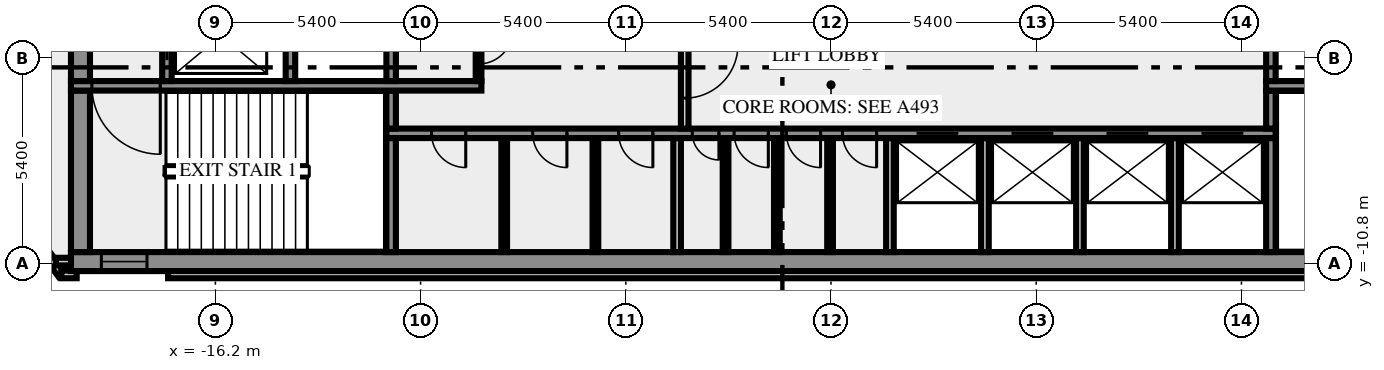
"""IFC4 building model, lengths in metres.
Left out: names, types, materials, properties, quantities, classifications, styles, units other than length and angle.
Written with IfcOpenShell. Run it as: python <this file> out.ifc"""

import sys

from ifc_helpers import new_model, si_unit, direction, frame, frame_2d, origin, place, context, subcontext, project, spatial, rectangle, extrude, element, fill, save


model = new_model("IFC4")
c1 = context("Model", 3, precision=1e-05, world=origin(), true_north=direction((0.0, 1.0)))
c2 = subcontext(c1, "Body", "Model", "MODEL_VIEW")
j1 = project(units=[si_unit("LENGTHUNIT", "METRE"), si_unit("PLANEANGLEUNIT", "RADIAN")], contexts=[c1])
p1 = place(None, origin())
s1 = spatial("IfcSite", under=j1, at=p1, CompositionType="ELEMENT")
p2 = place(p1, origin())
s2 = spatial("IfcBuilding", under=s1, at=p2, CompositionType="ELEMENT")
p3 = place(p2, frame((0.0, 0.0, 206.0)))
s3 = spatial("IfcBuildingStorey", under=s2, at=p3, CompositionType="ELEMENT", Elevation=206.0)
p4 = place(p3, frame((-21.833, -8.909, 0.0), z_axis=(0.0, 0.0, 1.0), x_axis=(0.587766567315, -0.809030569476, 0.0)))
e1 = element("IfcWall", 1, at=p4, inside=s3, PredefinedType="SOLIDWALL", context=c2, shape_type="SweptSolid", body=[
    extrude(rectangle(XDim=2.688, YDim=0.2, at=frame_2d((1.344, 0.0))), origin(), (0.0, 0.0, 1.0), 3.65),
])
p5 = place(p3, frame((-20.256, -11.088, 0.0), z_axis=(0.0, 0.0, 1.0), x_axis=(1.0, 0.0, 0.0)))
e2 = element("IfcWall", 2, at=p5, inside=s3, PredefinedType="SOLIDWALL", context=c2, shape_type="SweptSolid", body=[
    extrude(rectangle(XDim=0.406, YDim=0.2, at=frame_2d((0.203, 0.0))), origin(), (0.0, 0.0, 1.0), 3.65),
])
p6 = place(p3, frame((-17.444, -11.088, 0.0), z_axis=(0.0, 0.0, 1.0), x_axis=(1.0, 0.0, 0.0)))
e3 = element("IfcWall", 3, at=p6, inside=s3, PredefinedType="SOLIDWALL", context=c2, shape_type="SweptSolid", body=[
    extrude(rectangle(XDim=34.888, YDim=0.2, at=frame_2d((17.444, 0.0))), origin(), (0.0, 0.0, 1.0), 3.65),
])
p7 = place(p3, frame((-19.98, -10.75, 0.0), z_axis=(0.0, 0.0, 1.0), x_axis=(-1.0, 0.0, 0.0)))
e4 = element("IfcWall", 4, at=p7, inside=s3, PredefinedType="SOLIDWALL", context=c2, shape_type="SweptSolid", body=[
    extrude(rectangle(XDim=0.417, YDim=0.2, at=frame_2d((0.208, 0.0))), origin(), (0.0, 0.0, 1.0), 3.65),
])
p8 = place(p3, frame((-20.0, -10.75, 0.0), z_axis=(0.0, 0.0, 1.0), x_axis=(1.0, 0.0, 0.0)))
e5 = element("IfcWall", 5, at=p8, inside=s3, PredefinedType="SHEAR", context=c2, shape_type="SweptSolid", body=[
    extrude(rectangle(XDim=40.0, YDim=0.5, at=frame_2d((20.0, 0.0))), origin(), (0.0, 0.0, 1.0), 3.65),
])
p9 = place(p8, frame((0.8, 0.0, 1.0)))
e6 = element("IfcOpeningElement", 6, at=p9, cuts=e5, PredefinedType="OPENING", context=c2, shape_type="SweptSolid", body=[
    extrude(rectangle(XDim=1.2, YDim=1.2, at=frame_2d((0.6, 0.6))), frame((0.0, 0.26, 0.0), z_axis=(0.0, -1.0, 0.0), x_axis=(1.0, 0.0, 0.0)), (0.0, 0.0, 1.0), 0.52),
])
p10 = place(p8, frame((38.0, 0.0, 1.0)))
e7 = element("IfcOpeningElement", 7, at=p10, cuts=e5, PredefinedType="OPENING", context=c2, shape_type="SweptSolid", body=[
    extrude(rectangle(XDim=1.2, YDim=1.2, at=frame_2d((0.6, 0.6))), frame((0.0, 0.26, 0.0), z_axis=(0.0, -1.0, 0.0), x_axis=(1.0, 0.0, 0.0)), (0.0, 0.0, 1.0), 0.52),
])
p11 = place(p3, frame((-19.75, -10.5, 0.0), z_axis=(0.0, 0.0, 1.0), x_axis=(0.0, 1.0, 0.0)))
e8 = element("IfcWall", 8, at=p11, inside=s3, PredefinedType="SHEAR", context=c2, shape_type="SweptSolid", body=[
    extrude(rectangle(XDim=4.25, YDim=0.5, at=frame_2d((2.125, 0.0))), origin(), (0.0, 0.0, 1.0), 3.65),
])
p12 = place(p3, frame((-11.575, -10.5, 0.0), z_axis=(0.0, 0.0, 1.0), x_axis=(0.0, 1.0, 0.0)))
e9 = element("IfcWall", 9, at=p12, inside=s3, PredefinedType="SHEAR", context=c2, shape_type="SweptSolid", body=[
    extrude(rectangle(XDim=3.0, YDim=0.25, at=frame_2d((1.5, 0.0))), origin(), (0.0, 0.0, 1.0), 3.65),
])
for number, where, z_axis, x_axis in (
    (10, (-8.6, -10.5, 0.0), (0.0, 0.0, 1.0), (0.0, 1.0, 0.0)),
    (11, (-6.2, -10.5, 0.0), (0.0, 0.0, 1.0), (0.0, 1.0, 0.0)),
):
    element("IfcWall", number, at=place(p3, frame(where, z_axis=z_axis, x_axis=x_axis)), inside=s3, PredefinedType="PARTITIONING", context=c2, shape_type="SweptSolid", body=[
        extrude(rectangle(XDim=3.0, YDim=0.15, at=frame_2d((1.5, 0.0))), origin(), (0.0, 0.0, 1.0), 3.65),
    ])
p13 = place(p3, frame((-4.05, -10.5, 0.0), z_axis=(0.0, 0.0, 1.0), x_axis=(0.0, 1.0, 0.0)))
e12 = element("IfcWall", 12, at=p13, inside=s3, PredefinedType="SOLIDWALL", context=c2, shape_type="SweptSolid", body=[
    extrude(rectangle(XDim=3.0, YDim=0.2, at=frame_2d((1.5, 0.0))), origin(), (0.0, 0.0, 1.0), 3.65),
])
for number, where, z_axis, x_axis in (
    (13, (-2.775, -10.5, 0.0), (0.0, 0.0, 1.0), (0.0, 1.0, 0.0)),
    (14, (-1.425, -10.5, 0.0), (0.0, 0.0, 1.0), (0.0, 1.0, 0.0)),
    (15, (-0.025, -10.5, 0.0), (0.0, 0.0, 1.0), (0.0, 1.0, 0.0)),
):
    element("IfcWall", number, at=place(p3, frame(where, z_axis=z_axis, x_axis=x_axis)), inside=s3, PredefinedType="PARTITIONING", context=c2, shape_type="SweptSolid", body=[
        extrude(rectangle(XDim=3.0, YDim=0.15, at=frame_2d((1.5, 0.0))), origin(), (0.0, 0.0, 1.0), 3.65),
    ])
for number, where, z_axis, x_axis in (
    (16, (1.55, -10.5, 0.0), (0.0, 0.0, 1.0), (0.0, 1.0, 0.0)),
    (17, (4.05, -10.5, 0.0), (0.0, 0.0, 1.0), (0.0, 1.0, 0.0)),
    (18, (6.55, -10.5, 0.0), (0.0, 0.0, 1.0), (0.0, 1.0, 0.0)),
    (19, (9.05, -10.5, 0.0), (0.0, 0.0, 1.0), (0.0, 1.0, 0.0)),
):
    element("IfcWall", number, at=place(p3, frame(where, z_axis=z_axis, x_axis=x_axis)), inside=s3, PredefinedType="SOLIDWALL", context=c2, shape_type="SweptSolid", body=[
        extrude(rectangle(XDim=3.0, YDim=0.2, at=frame_2d((1.5, 0.0))), origin(), (0.0, 0.0, 1.0), 3.65),
    ])
p14 = place(p3, frame((11.575, -10.5, 0.0), z_axis=(0.0, 0.0, 1.0), x_axis=(0.0, 1.0, 0.0)))
e20 = element("IfcWall", 20, at=p14, inside=s3, PredefinedType="SHEAR", context=c2, shape_type="SweptSolid", body=[
    extrude(rectangle(XDim=3.0, YDim=0.25, at=frame_2d((1.5, 0.0))), origin(), (0.0, 0.0, 1.0), 3.65),
])
p15 = place(p3, frame((11.7, -7.375, 0.0), z_axis=(0.0, 0.0, 1.0), x_axis=(-1.0, 0.0, 0.0)))
e21 = element("IfcWall", 21, at=p15, inside=s3, PredefinedType="SHEAR", context=c2, shape_type="SweptSolid", body=[
    extrude(rectangle(XDim=23.4, YDim=0.25, at=frame_2d((11.7, 0.0))), origin(), (0.0, 0.0, 1.0), 3.65),
])
p16 = place(p15, frame((21.312, 0.0, 0.0)))
e22 = element("IfcOpeningElement", 22, at=p16, cuts=e21, PredefinedType="OPENING", context=c2, shape_type="SweptSolid", body=[
    extrude(rectangle(XDim=0.9, YDim=2.1, at=frame_2d((0.45, 1.05))), frame((0.0, 0.135, 0.0), z_axis=(0.0, -1.0, 0.0), x_axis=(1.0, 0.0, 0.0)), (0.0, 0.0, 1.0), 0.27),
])
p17 = place(p15, frame((18.65, 0.0, 0.0)))
e23 = element("IfcOpeningElement", 23, at=p17, cuts=e21, PredefinedType="OPENING", context=c2, shape_type="SweptSolid", body=[
    extrude(rectangle(XDim=0.9, YDim=2.1, at=frame_2d((0.45, 1.05))), frame((0.0, 0.135, 0.0), z_axis=(0.0, -1.0, 0.0), x_axis=(1.0, 0.0, 0.0)), (0.0, 0.0, 1.0), 0.27),
])
p18 = place(p15, frame((16.388, 0.0, 0.0)))
e24 = element("IfcOpeningElement", 24, at=p18, cuts=e21, PredefinedType="OPENING", context=c2, shape_type="SweptSolid", body=[
    extrude(rectangle(XDim=0.9, YDim=2.1, at=frame_2d((0.45, 1.05))), frame((0.0, 0.135, 0.0), z_axis=(0.0, -1.0, 0.0), x_axis=(1.0, 0.0, 0.0)), (0.0, 0.0, 1.0), 0.27),
])
p19 = place(p15, frame((14.65, 0.0, 0.0)))
e25 = element("IfcOpeningElement", 25, at=p19, cuts=e21, PredefinedType="OPENING", context=c2, shape_type="SweptSolid", body=[
    extrude(rectangle(XDim=0.7, YDim=2.1, at=frame_2d((0.35, 1.05))), frame((0.0, 0.135, 0.0), z_axis=(0.0, -1.0, 0.0), x_axis=(1.0, 0.0, 0.0)), (0.0, 0.0, 1.0), 0.27),
])
p20 = place(p15, frame((13.35, 0.0, 0.0)))
e26 = element("IfcOpeningElement", 26, at=p20, cuts=e21, PredefinedType="OPENING", context=c2, shape_type="SweptSolid", body=[
    extrude(rectangle(XDim=0.9, YDim=2.1, at=frame_2d((0.45, 1.05))), frame((0.0, 0.135, 0.0), z_axis=(0.0, -1.0, 0.0), x_axis=(1.0, 0.0, 0.0)), (0.0, 0.0, 1.0), 0.27),
])
p21 = place(p15, frame((11.975, 0.0, 0.0)))
e27 = element("IfcOpeningElement", 27, at=p21, cuts=e21, PredefinedType="OPENING", context=c2, shape_type="SweptSolid", body=[
    extrude(rectangle(XDim=0.9, YDim=2.1, at=frame_2d((0.45, 1.05))), frame((0.0, 0.135, 0.0), z_axis=(0.0, -1.0, 0.0), x_axis=(1.0, 0.0, 0.0)), (0.0, 0.0, 1.0), 0.27),
])
p22 = place(p15, frame((10.5, 0.0, 0.0)))
e28 = element("IfcOpeningElement", 28, at=p22, cuts=e21, PredefinedType="OPENING", context=c2, shape_type="SweptSolid", body=[
    extrude(rectangle(XDim=0.9, YDim=2.1, at=frame_2d((0.45, 1.05))), frame((0.0, 0.135, 0.0), z_axis=(0.0, -1.0, 0.0), x_axis=(1.0, 0.0, 0.0)), (0.0, 0.0, 1.0), 0.27),
])
p23 = place(p15, frame((8.35, 0.0, 0.0)))
e29 = element("IfcOpeningElement", 29, at=p23, cuts=e21, PredefinedType="OPENING", context=c2, shape_type="SweptSolid", body=[
    extrude(rectangle(XDim=1.1, YDim=2.1, at=frame_2d((0.55, 1.05))), frame((0.0, 0.135, 0.0), z_axis=(0.0, -1.0, 0.0), x_axis=(1.0, 0.0, 0.0)), (0.0, 0.0, 1.0), 0.27),
])
p24 = place(p15, frame((5.85, 0.0, 0.0)))
e30 = element("IfcOpeningElement", 30, at=p24, cuts=e21, PredefinedType="OPENING", context=c2, shape_type="SweptSolid", body=[
    extrude(rectangle(XDim=1.1, YDim=2.1, at=frame_2d((0.55, 1.05))), frame((0.0, 0.135, 0.0), z_axis=(0.0, -1.0, 0.0), x_axis=(1.0, 0.0, 0.0)), (0.0, 0.0, 1.0), 0.27),
])
p25 = place(p15, frame((3.35, 0.0, 0.0)))
e31 = element("IfcOpeningElement", 31, at=p25, cuts=e21, PredefinedType="OPENING", context=c2, shape_type="SweptSolid", body=[
    extrude(rectangle(XDim=1.1, YDim=2.1, at=frame_2d((0.55, 1.05))), frame((0.0, 0.135, 0.0), z_axis=(0.0, -1.0, 0.0), x_axis=(1.0, 0.0, 0.0)), (0.0, 0.0, 1.0), 0.27),
])
p26 = place(p15, frame((0.85, 0.0, 0.0)))
e32 = element("IfcOpeningElement", 32, at=p26, cuts=e21, PredefinedType="OPENING", context=c2, shape_type="SweptSolid", body=[
    extrude(rectangle(XDim=1.1, YDim=2.1, at=frame_2d((0.55, 1.05))), frame((0.0, 0.135, 0.0), z_axis=(0.0, -1.0, 0.0), x_axis=(1.0, 0.0, 0.0)), (0.0, 0.0, 1.0), 0.27),
])
p27 = place(p3, frame((-11.575, -7.25, 0.0), z_axis=(0.0, 0.0, 1.0), x_axis=(0.0, 1.0, 0.0)))
e33 = element("IfcWall", 33, at=p27, inside=s3, PredefinedType="SHEAR", context=c2, shape_type="SweptSolid", body=[
    extrude(rectangle(XDim=1.0, YDim=0.25, at=frame_2d((0.5, 0.0))), origin(), (0.0, 0.0, 1.0), 3.65),
])
p28 = place(p3, frame((-3.85, -4.25, 0.0), z_axis=(0.0, 0.0, 1.0), x_axis=(0.0, -1.0, 0.0)))
e34 = element("IfcWall", 34, at=p28, inside=s3, PredefinedType="SOLIDWALL", context=c2, shape_type="SweptSolid", body=[
    extrude(rectangle(XDim=3.0, YDim=0.2, at=frame_2d((1.5, 0.0))), origin(), (0.0, 0.0, 1.0), 3.65),
])
p29 = place(p28, frame((0.8, 0.0, 0.0)))
e35 = element("IfcOpeningElement", 35, at=p29, cuts=e34, PredefinedType="OPENING", context=c2, shape_type="SweptSolid", body=[
    extrude(rectangle(XDim=1.4, YDim=2.1, at=frame_2d((0.7, 1.05))), frame((0.0, 0.11, 0.0), z_axis=(0.0, -1.0, 0.0), x_axis=(1.0, 0.0, 0.0)), (0.0, 0.0, 1.0), 0.22),
])
p30 = place(p3, frame((11.575, -7.25, 0.0), z_axis=(0.0, 0.0, 1.0), x_axis=(0.0, 1.0, 0.0)))
e36 = element("IfcWall", 36, at=p30, inside=s3, PredefinedType="SHEAR", context=c2, shape_type="SweptSolid", body=[
    extrude(rectangle(XDim=1.0, YDim=0.25, at=frame_2d((0.5, 0.0))), origin(), (0.0, 0.0, 1.0), 3.65),
])
p31 = place(p3, frame((-9.2, -6.125, 0.0), z_axis=(0.0, 0.0, 1.0), x_axis=(-1.0, 0.0, 0.0)))
e37 = element("IfcWall", 37, at=p31, inside=s3, PredefinedType="SHEAR", context=c2, shape_type="SweptSolid", body=[
    extrude(rectangle(XDim=10.8, YDim=0.25, at=frame_2d((5.4, 0.0))), origin(), (0.0, 0.0, 1.0), 3.65),
])
p32 = place(p31, frame((8.45, 0.0, 0.0)))
e38 = element("IfcOpeningElement", 38, at=p32, cuts=e37, PredefinedType="OPENING", context=c2, shape_type="SweptSolid", body=[
    extrude(rectangle(XDim=1.8, YDim=2.1, at=frame_2d((0.9, 1.05))), frame((0.0, 0.135, 0.0), z_axis=(0.0, -1.0, 0.0), x_axis=(1.0, 0.0, 0.0)), (0.0, 0.0, 1.0), 0.27),
])
p33 = place(p3, frame((19.5, -6.125, 0.0), z_axis=(0.0, 0.0, 1.0), x_axis=(-1.0, 0.0, 0.0)))
e39 = element("IfcWall", 39, at=p33, inside=s3, PredefinedType="SHEAR", context=c2, shape_type="SweptSolid", body=[
    extrude(rectangle(XDim=8.05, YDim=0.25, at=frame_2d((4.025, 0.0))), origin(), (0.0, 0.0, 1.0), 3.65),
])
p34 = place(p33, frame((0.05, 0.0, 0.0)))
e40 = element("IfcOpeningElement", 40, at=p34, cuts=e39, PredefinedType="OPENING", context=c2, shape_type="SweptSolid", body=[
    extrude(rectangle(XDim=1.8, YDim=2.1, at=frame_2d((0.9, 1.05))), frame((0.0, 0.135, 0.0), z_axis=(0.0, -1.0, 0.0), x_axis=(1.0, 0.0, 0.0)), (0.0, 0.0, 1.0), 0.27),
])
p35 = place(p3, frame((-19.75, -6.0, 0.0), z_axis=(0.0, 0.0, 1.0), x_axis=(0.0, 1.0, 0.0)))
e41 = element("IfcWall", 41, at=p35, inside=s3, PredefinedType="SHEAR", context=c2, shape_type="SweptSolid", body=[
    extrude(rectangle(XDim=4.3, YDim=0.5, at=frame_2d((2.15, 0.0))), origin(), (0.0, 0.0, 1.0), 3.65),
])
p36 = place(p3, frame((-17.475, -6.0, 0.0), z_axis=(0.0, 0.0, 1.0), x_axis=(0.0, 1.0, 0.0)))
e42 = element("IfcWall", 42, at=p36, inside=s3, PredefinedType="SHEAR", context=c2, shape_type="SweptSolid", body=[
    extrude(rectangle(XDim=4.3, YDim=0.25, at=frame_2d((2.15, 0.0))), origin(), (0.0, 0.0, 1.0), 3.65),
])
p37 = place(p36, frame((0.55, 0.0, 0.0)))
e43 = element("IfcOpeningElement", 43, at=p37, cuts=e42, PredefinedType="OPENING", context=c2, shape_type="SweptSolid", body=[
    extrude(rectangle(XDim=1.3, YDim=2.1, at=frame_2d((0.65, 1.05))), frame((0.0, 0.135, 0.0), z_axis=(0.0, -1.0, 0.0), x_axis=(1.0, 0.0, 0.0)), (0.0, 0.0, 1.0), 0.27),
])
p38 = place(p3, frame((-14.225, -6.0, 0.0), z_axis=(0.0, 0.0, 1.0), x_axis=(0.0, 1.0, 0.0)))
e44 = element("IfcWall", 44, at=p38, inside=s3, PredefinedType="SHEAR", context=c2, shape_type="SweptSolid", body=[
    extrude(rectangle(XDim=4.3, YDim=0.25, at=frame_2d((2.15, 0.0))), origin(), (0.0, 0.0, 1.0), 3.65),
])
p39 = place(p3, frame((-11.575, -6.0, 0.0), z_axis=(0.0, 0.0, 1.0), x_axis=(0.0, 1.0, 0.0)))
e45 = element("IfcWall", 45, at=p39, inside=s3, PredefinedType="SHEAR", context=c2, shape_type="SweptSolid", body=[
    extrude(rectangle(XDim=1.75, YDim=0.25, at=frame_2d((0.875, 0.0))), origin(), (0.0, 0.0, 1.0), 3.65),
])
p40 = place(p3, frame((-9.275, -4.25, 0.0), z_axis=(0.0, 0.0, 1.0), x_axis=(0.0, -1.0, 0.0)))
e46 = element("IfcWall", 46, at=p40, inside=s3, PredefinedType="PARTITIONING", context=c2, shape_type="SweptSolid", body=[
    extrude(rectangle(XDim=1.75, YDim=0.15, at=frame_2d((0.875, 0.0))), origin(), (0.0, 0.0, 1.0), 3.65),
])
p41 = place(p40, frame((0.4, 0.0, 0.0)))
e47 = element("IfcOpeningElement", 47, at=p41, cuts=e46, PredefinedType="OPENING", context=c2, shape_type="SweptSolid", body=[
    extrude(rectangle(XDim=0.9, YDim=2.1, at=frame_2d((0.45, 1.05))), frame((0.0, 0.085, 0.0), z_axis=(0.0, -1.0, 0.0), x_axis=(1.0, 0.0, 0.0)), (0.0, 0.0, 1.0), 0.17),
])
p42 = place(p3, frame((11.575, -6.0, 0.0), z_axis=(0.0, 0.0, 1.0), x_axis=(0.0, 1.0, 0.0)))
e48 = element("IfcWall", 48, at=p42, inside=s3, PredefinedType="SHEAR", context=c2, shape_type="SweptSolid", body=[
    extrude(rectangle(XDim=1.75, YDim=0.25, at=frame_2d((0.875, 0.0))), origin(), (0.0, 0.0, 1.0), 3.65),
])
p43 = place(p9, origin())
e49 = element("IfcWindow", 49, at=p43, inside=s3, PartitioningType="SINGLE_PANEL", PredefinedType="WINDOW", context=c2, shape_type="SweptSolid", body=[
    extrude(rectangle(XDim=1.2, YDim=1.2, at=frame_2d((0.6, 0.6))), frame((0.0, 0.03, 0.0), z_axis=(0.0, -1.0, 0.0), x_axis=(1.0, 0.0, 0.0)), (0.0, 0.0, 1.0), 0.06),
])
fill(e6, e49)
p44 = place(p16, origin())
e50 = element("IfcDoor", 50, at=p44, inside=s3, OperationType="SINGLE_SWING_RIGHT", PredefinedType="DOOR", context=c2, shape_type="SweptSolid", body=[
    extrude(rectangle(XDim=0.9, YDim=2.1, at=frame_2d((0.45, 1.05))), frame((0.0, 0.025, 0.0), z_axis=(0.0, -1.0, 0.0), x_axis=(1.0, 0.0, 0.0)), (0.0, 0.0, 1.0), 0.05),
])
fill(e22, e50)
p45 = place(p17, origin())
e51 = element("IfcDoor", 51, at=p45, inside=s3, OperationType="SINGLE_SWING_RIGHT", PredefinedType="DOOR", context=c2, shape_type="SweptSolid", body=[
    extrude(rectangle(XDim=0.9, YDim=2.1, at=frame_2d((0.45, 1.05))), frame((0.0, 0.025, 0.0), z_axis=(0.0, -1.0, 0.0), x_axis=(1.0, 0.0, 0.0)), (0.0, 0.0, 1.0), 0.05),
])
fill(e23, e51)
p46 = place(p18, origin())
e52 = element("IfcDoor", 52, at=p46, inside=s3, OperationType="SINGLE_SWING_RIGHT", PredefinedType="DOOR", context=c2, shape_type="SweptSolid", body=[
    extrude(rectangle(XDim=0.9, YDim=2.1, at=frame_2d((0.45, 1.05))), frame((0.0, 0.025, 0.0), z_axis=(0.0, -1.0, 0.0), x_axis=(1.0, 0.0, 0.0)), (0.0, 0.0, 1.0), 0.05),
])
fill(e24, e52)
p47 = place(p19, origin())
e53 = element("IfcDoor", 53, at=p47, inside=s3, OperationType="SINGLE_SWING_RIGHT", PredefinedType="DOOR", context=c2, shape_type="SweptSolid", body=[
    extrude(rectangle(XDim=0.7, YDim=2.1, at=frame_2d((0.35, 1.05))), frame((0.0, 0.025, 0.0), z_axis=(0.0, -1.0, 0.0), x_axis=(1.0, 0.0, 0.0)), (0.0, 0.0, 1.0), 0.05),
])
fill(e25, e53)
p48 = place(p20, origin())
e54 = element("IfcDoor", 54, at=p48, inside=s3, OperationType="SINGLE_SWING_RIGHT", PredefinedType="DOOR", context=c2, shape_type="SweptSolid", body=[
    extrude(rectangle(XDim=0.9, YDim=2.1, at=frame_2d((0.45, 1.05))), frame((0.0, 0.025, 0.0), z_axis=(0.0, -1.0, 0.0), x_axis=(1.0, 0.0, 0.0)), (0.0, 0.0, 1.0), 0.05),
])
fill(e26, e54)
p49 = place(p21, origin())
e55 = element("IfcDoor", 55, at=p49, inside=s3, OperationType="SINGLE_SWING_RIGHT", PredefinedType="DOOR", context=c2, shape_type="SweptSolid", body=[
    extrude(rectangle(XDim=0.9, YDim=2.1, at=frame_2d((0.45, 1.05))), frame((0.0, 0.025, 0.0), z_axis=(0.0, -1.0, 0.0), x_axis=(1.0, 0.0, 0.0)), (0.0, 0.0, 1.0), 0.05),
])
fill(e27, e55)
p50 = place(p22, origin())
e56 = element("IfcDoor", 56, at=p50, inside=s3, OperationType="SINGLE_SWING_LEFT", PredefinedType="DOOR", context=c2, shape_type="SweptSolid", body=[
    extrude(rectangle(XDim=0.9, YDim=2.1, at=frame_2d((0.45, 1.05))), frame((0.0, 0.025, 0.0), z_axis=(0.0, -1.0, 0.0), x_axis=(1.0, 0.0, 0.0)), (0.0, 0.0, 1.0), 0.05),
])
fill(e28, e56)
p51 = place(p23, origin())
e57 = element("IfcDoor", 57, at=p51, inside=s3, OperationType="DOUBLE_DOOR_SLIDING", PredefinedType="DOOR", context=c2, shape_type="SweptSolid", body=[
    extrude(rectangle(XDim=1.1, YDim=2.1, at=frame_2d((0.55, 1.05))), frame((0.0, 0.025, 0.0), z_axis=(0.0, -1.0, 0.0), x_axis=(1.0, 0.0, 0.0)), (0.0, 0.0, 1.0), 0.05),
])
fill(e29, e57)
p52 = place(p24, origin())
e58 = element("IfcDoor", 58, at=p52, inside=s3, OperationType="DOUBLE_DOOR_SLIDING", PredefinedType="DOOR", context=c2, shape_type="SweptSolid", body=[
    extrude(rectangle(XDim=1.1, YDim=2.1, at=frame_2d((0.55, 1.05))), frame((0.0, 0.025, 0.0), z_axis=(0.0, -1.0, 0.0), x_axis=(1.0, 0.0, 0.0)), (0.0, 0.0, 1.0), 0.05),
])
fill(e30, e58)
p53 = place(p25, origin())
e59 = element("IfcDoor", 59, at=p53, inside=s3, OperationType="DOUBLE_DOOR_SLIDING", PredefinedType="DOOR", context=c2, shape_type="SweptSolid", body=[
    extrude(rectangle(XDim=1.1, YDim=2.1, at=frame_2d((0.55, 1.05))), frame((0.0, 0.025, 0.0), z_axis=(0.0, -1.0, 0.0), x_axis=(1.0, 0.0, 0.0)), (0.0, 0.0, 1.0), 0.05),
])
fill(e31, e59)
p54 = place(p26, origin())
e60 = element("IfcDoor", 60, at=p54, inside=s3, OperationType="DOUBLE_DOOR_SLIDING", PredefinedType="DOOR", context=c2, shape_type="SweptSolid", body=[
    extrude(rectangle(XDim=1.1, YDim=2.1, at=frame_2d((0.55, 1.05))), frame((0.0, 0.025, 0.0), z_axis=(0.0, -1.0, 0.0), x_axis=(1.0, 0.0, 0.0)), (0.0, 0.0, 1.0), 0.05),
])
fill(e32, e60)
p55 = place(p29, origin())
e61 = element("IfcDoor", 61, at=p55, inside=s3, OperationType="DOUBLE_DOOR_SINGLE_SWING", PredefinedType="DOOR", context=c2, shape_type="SweptSolid", body=[
    extrude(rectangle(XDim=1.4, YDim=2.1, at=frame_2d((0.7, 1.05))), frame((0.0, 0.025, 0.0), z_axis=(0.0, -1.0, 0.0), x_axis=(1.0, 0.0, 0.0)), (0.0, 0.0, 1.0), 0.05),
])
fill(e35, e61)
p56 = place(p32, origin())
e62 = element("IfcDoor", 62, at=p56, inside=s3, OperationType="DOUBLE_DOOR_SINGLE_SWING", PredefinedType="DOOR", context=c2, shape_type="SweptSolid", body=[
    extrude(rectangle(XDim=1.8, YDim=2.1, at=frame_2d((0.9, 1.05))), frame((0.0, 0.025, 0.0), z_axis=(0.0, -1.0, 0.0), x_axis=(1.0, 0.0, 0.0)), (0.0, 0.0, 1.0), 0.05),
])
fill(e38, e62)
p57 = place(p37, origin())
e63 = element("IfcDoor", 63, at=p57, inside=s3, OperationType="DOUBLE_DOOR_SLIDING", PredefinedType="DOOR", context=c2, shape_type="SweptSolid", body=[
    extrude(rectangle(XDim=1.3, YDim=2.1, at=frame_2d((0.65, 1.05))), frame((0.0, 0.025, 0.0), z_axis=(0.0, -1.0, 0.0), x_axis=(1.0, 0.0, 0.0)), (0.0, 0.0, 1.0), 0.05),
])
fill(e43, e63)
p58 = place(p41, origin())
e64 = element("IfcDoor", 64, at=p58, inside=s3, OperationType="SINGLE_SWING_LEFT", PredefinedType="DOOR", context=c2, shape_type="SweptSolid", body=[
    extrude(rectangle(XDim=0.9, YDim=2.1, at=frame_2d((0.45, 1.05))), frame((0.0, 0.025, 0.0), z_axis=(0.0, -1.0, 0.0), x_axis=(1.0, 0.0, 0.0)), (0.0, 0.0, 1.0), 0.05),
])
fill(e47, e64)
save(model, sys.argv[1])
